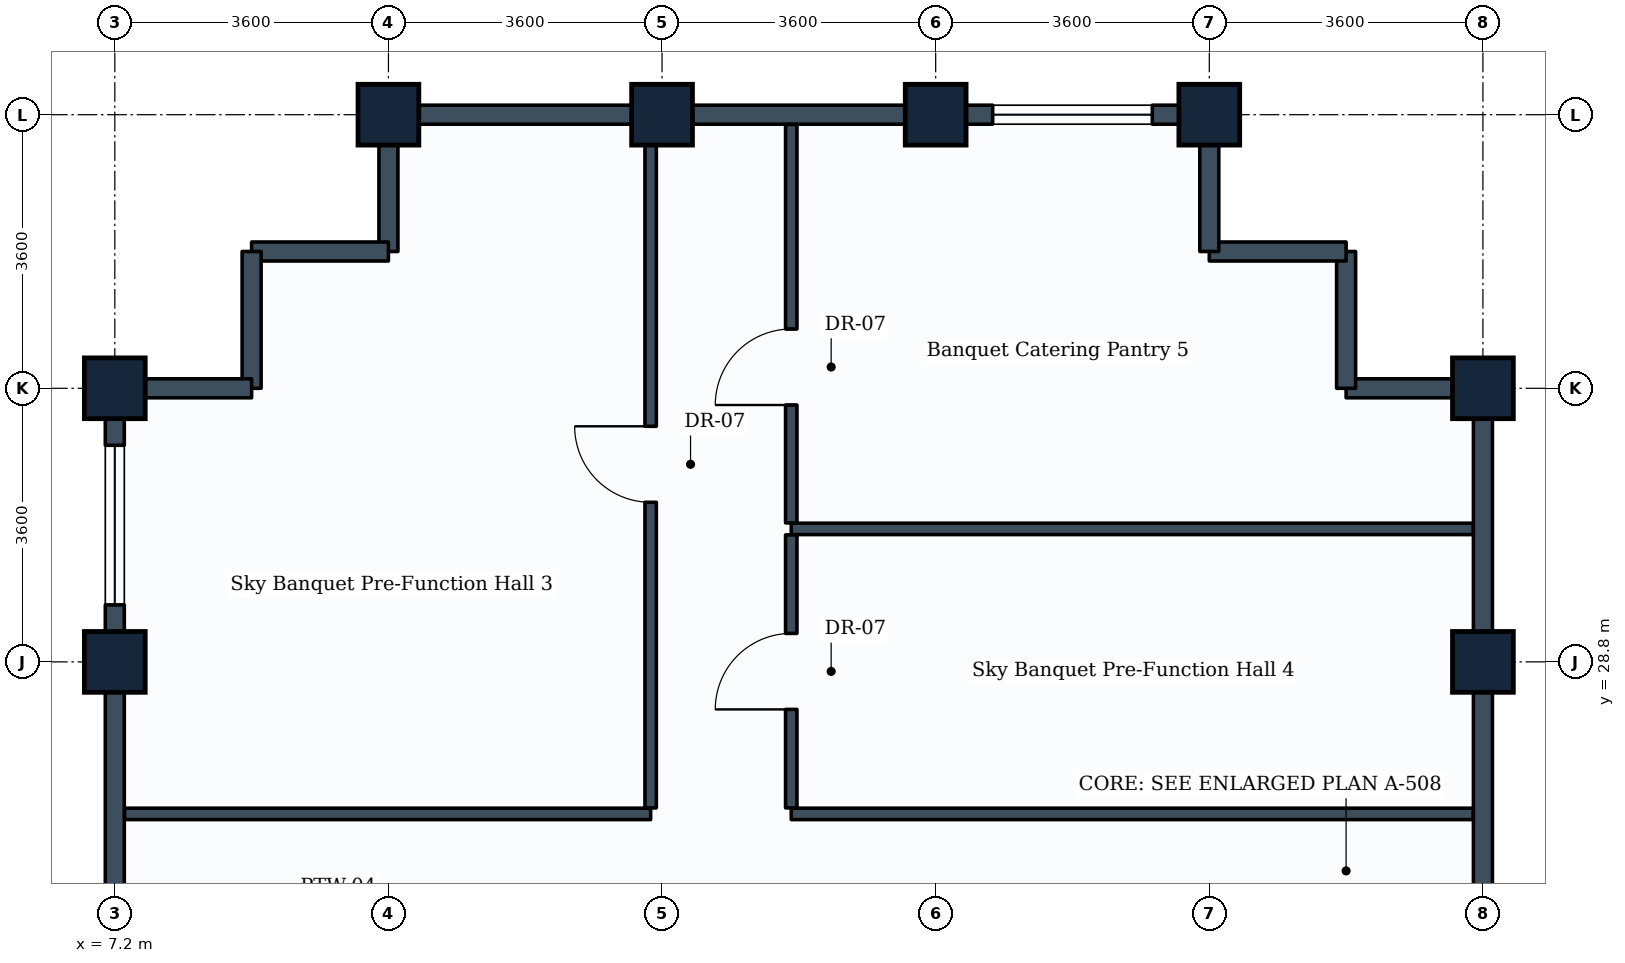
"""IFC4 building model, lengths in metres.
Left out: names, types, materials, properties, quantities, classifications, styles, units other than length and angle.
Written with IfcOpenShell. Run it as: python <this file> out.ifc"""

import sys

from ifc_helpers import new_model, si_unit, direction, frame, frame_2d, origin, origin_2d, place, context, subcontext, project, spatial, rectangle, extrude, element, fill, save


model = new_model("IFC4")
c1 = context("Model", 3, precision=1e-05, world=origin(), true_north=direction((0.0, 1.0)))
c2 = subcontext(c1, "Body", "Model", "MODEL_VIEW")
j1 = project(units=[si_unit("LENGTHUNIT", "METRE"), si_unit("PLANEANGLEUNIT", "RADIAN")], contexts=[c1])
p1 = place(None, origin())
s1 = spatial("IfcSite", under=j1, at=p1, CompositionType="ELEMENT")
p2 = place(p1, origin())
s2 = spatial("IfcBuilding", under=s1, at=p2, CompositionType="ELEMENT")
p3 = place(p2, frame((0.0, 0.0, 246.2)))
s3 = spatial("IfcBuildingStorey", under=s2, at=p3, CompositionType="ELEMENT", Elevation=246.2)
for number, where, z_axis, x_axis in (
    (1, (7.2, 28.8, 0.0), (0.0, 0.0, 1.0), (0.0, 1.0, 0.0)),
    (2, (7.2, 32.4, 0.0), (0.0, 0.0, 1.0), (0.0, 1.0, 0.0)),
    (3, (10.8, 36.0, 0.0), (0.0, 0.0, 1.0), (1.0, 0.0, 0.0)),
    (4, (14.4, 36.0, 0.0), (0.0, 0.0, 1.0), (1.0, 0.0, 0.0)),
    (5, (18.0, 36.0, 0.0), (0.0, 0.0, 1.0), (1.0, 0.0, 0.0)),
    (6, (21.6, 36.0, 0.0), (0.0, 0.0, 1.0), (1.0, 0.0, 0.0)),
    (7, (25.2, 28.8, 0.0), (0.0, 0.0, 1.0), (0.0, 1.0, 0.0)),
    (8, (25.2, 32.4, 0.0), (0.0, 0.0, 1.0), (0.0, 1.0, 0.0)),
):
    element("IfcColumn", number, at=place(p3, frame(where, z_axis=z_axis, x_axis=x_axis)), inside=s3, PredefinedType="COLUMN", context=c2, shape_type="SweptSolid", body=[
        extrude(rectangle(XDim=0.8, YDim=0.8, at=origin_2d()), origin(), (0.0, 0.0, 1.0), 3.6),
    ])
p4 = place(p3, frame((25.2, 28.8, 0.0), z_axis=(0.0, 0.0, 1.0), x_axis=(0.0, -1.0, 0.0)))
e9 = element("IfcWall", 9, at=p4, inside=s3, PredefinedType="STANDARD", context=c2, shape_type="SweptSolid", body=[
    extrude(rectangle(XDim=3.6, YDim=0.25, at=frame_2d((1.8, 0.0))), origin(), (0.0, 0.0, 1.0), 2.83),
])
p5 = place(p3, frame((25.2, 32.4, 0.0), z_axis=(0.0, 0.0, 1.0), x_axis=(0.0, -1.0, 0.0)))
e10 = element("IfcWall", 10, at=p5, inside=s3, PredefinedType="STANDARD", context=c2, shape_type="SweptSolid", body=[
    extrude(rectangle(XDim=3.6, YDim=0.25, at=frame_2d((1.8, 0.0))), origin(), (0.0, 0.0, 1.0), 2.83),
])
p6 = place(p3, frame((23.4, 32.4, 0.0), z_axis=(0.0, 0.0, 1.0), x_axis=(1.0, 0.0, 0.0)))
e11 = element("IfcWall", 11, at=p6, inside=s3, PredefinedType="STANDARD", context=c2, shape_type="SweptSolid", body=[
    extrude(rectangle(XDim=1.8, YDim=0.25, at=frame_2d((0.9, 0.0))), origin(), (0.0, 0.0, 1.0), 2.83),
])
p7 = place(p3, frame((23.4, 32.4, 0.0), z_axis=(0.0, 0.0, 1.0), x_axis=(0.0, 1.0, 0.0)))
e12 = element("IfcWall", 12, at=p7, inside=s3, PredefinedType="STANDARD", context=c2, shape_type="SweptSolid", body=[
    extrude(rectangle(XDim=1.8, YDim=0.25, at=frame_2d((0.9, 0.0))), origin(), (0.0, 0.0, 1.0), 3.265),
])
p8 = place(p3, frame((21.6, 34.2, 0.0), z_axis=(0.0, 0.0, 1.0), x_axis=(1.0, 0.0, 0.0)))
e13 = element("IfcWall", 13, at=p8, inside=s3, PredefinedType="STANDARD", context=c2, shape_type="SweptSolid", body=[
    extrude(rectangle(XDim=1.8, YDim=0.25, at=frame_2d((0.9, 0.0))), origin(), (0.0, 0.0, 1.0), 3.265),
])
p9 = place(p3, frame((21.6, 34.2, 0.0), z_axis=(0.0, 0.0, 1.0), x_axis=(0.0, 1.0, 0.0)))
e14 = element("IfcWall", 14, at=p9, inside=s3, PredefinedType="STANDARD", context=c2, shape_type="SweptSolid", body=[
    extrude(rectangle(XDim=1.8, YDim=0.25, at=frame_2d((0.9, 0.0))), origin(), (0.0, 0.0, 1.0), 2.83),
])
p10 = place(p3, frame((18.0, 36.0, 0.0), z_axis=(0.0, 0.0, 1.0), x_axis=(1.0, 0.0, 0.0)))
e15 = element("IfcWall", 15, at=p10, inside=s3, PredefinedType="STANDARD", context=c2, shape_type="SweptSolid", body=[
    extrude(rectangle(XDim=3.6, YDim=0.25, at=frame_2d((1.8, 0.0))), origin(), (0.0, 0.0, 1.0), 2.83),
])
p11 = place(p10, frame((0.75, 0.0, 0.85)))
e16 = element("IfcOpeningElement", 16, at=p11, cuts=e15, PredefinedType="OPENING", context=c2, shape_type="SweptSolid", body=[
    extrude(rectangle(XDim=2.1, YDim=1.35, at=frame_2d((1.05, 0.675))), frame((0.0, 0.135, 0.0), z_axis=(0.0, -1.0, 0.0), x_axis=(1.0, 0.0, 0.0)), (0.0, 0.0, 1.0), 0.27),
])
p12 = place(p3, frame((14.4, 36.0, 0.0), z_axis=(0.0, 0.0, 1.0), x_axis=(1.0, 0.0, 0.0)))
e17 = element("IfcWall", 17, at=p12, inside=s3, PredefinedType="STANDARD", context=c2, shape_type="SweptSolid", body=[
    extrude(rectangle(XDim=3.6, YDim=0.25, at=frame_2d((1.8, 0.0))), origin(), (0.0, 0.0, 1.0), 2.83),
])
p13 = place(p3, frame((10.8, 36.0, 0.0), z_axis=(0.0, 0.0, 1.0), x_axis=(1.0, 0.0, 0.0)))
e18 = element("IfcWall", 18, at=p13, inside=s3, PredefinedType="STANDARD", context=c2, shape_type="SweptSolid", body=[
    extrude(rectangle(XDim=3.6, YDim=0.25, at=frame_2d((1.8, 0.0))), origin(), (0.0, 0.0, 1.0), 2.83),
])
p14 = place(p3, frame((10.8, 34.2, 0.0), z_axis=(0.0, 0.0, 1.0), x_axis=(0.0, 1.0, 0.0)))
e19 = element("IfcWall", 19, at=p14, inside=s3, PredefinedType="STANDARD", context=c2, shape_type="SweptSolid", body=[
    extrude(rectangle(XDim=1.8, YDim=0.25, at=frame_2d((0.9, 0.0))), origin(), (0.0, 0.0, 1.0), 2.83),
])
for number, where, z_axis, x_axis in (
    (20, (9.0, 34.2, 0.0), (0.0, 0.0, 1.0), (1.0, 0.0, 0.0)),
    (21, (9.0, 32.4, 0.0), (0.0, 0.0, 1.0), (0.0, 1.0, 0.0)),
):
    element("IfcWall", number, at=place(p3, frame(where, z_axis=z_axis, x_axis=x_axis)), inside=s3, PredefinedType="STANDARD", context=c2, shape_type="SweptSolid", body=[
        extrude(rectangle(XDim=1.8, YDim=0.25, at=frame_2d((0.9, 0.0))), origin(), (0.0, 0.0, 1.0), 3.265),
    ])
p15 = place(p3, frame((7.2, 32.4, 0.0), z_axis=(0.0, 0.0, 1.0), x_axis=(1.0, 0.0, 0.0)))
e22 = element("IfcWall", 22, at=p15, inside=s3, PredefinedType="STANDARD", context=c2, shape_type="SweptSolid", body=[
    extrude(rectangle(XDim=1.8, YDim=0.25, at=frame_2d((0.9, 0.0))), origin(), (0.0, 0.0, 1.0), 2.83),
])
p16 = place(p3, frame((7.2, 28.8, 0.0), z_axis=(0.0, 0.0, 1.0), x_axis=(0.0, 1.0, 0.0)))
e23 = element("IfcWall", 23, at=p16, inside=s3, PredefinedType="STANDARD", context=c2, shape_type="SweptSolid", body=[
    extrude(rectangle(XDim=3.6, YDim=0.25, at=frame_2d((1.8, 0.0))), origin(), (0.0, 0.0, 1.0), 2.83),
])
p17 = place(p16, frame((0.75, 0.0, 0.85)))
e24 = element("IfcOpeningElement", 24, at=p17, cuts=e23, PredefinedType="OPENING", context=c2, shape_type="SweptSolid", body=[
    extrude(rectangle(XDim=2.1, YDim=1.35, at=frame_2d((1.05, 0.675))), frame((0.0, 0.135, 0.0), z_axis=(0.0, -1.0, 0.0), x_axis=(1.0, 0.0, 0.0)), (0.0, 0.0, 1.0), 0.27),
])
p18 = place(p3, frame((7.2, 25.2, 0.0), z_axis=(0.0, 0.0, 1.0), x_axis=(0.0, 1.0, 0.0)))
e25 = element("IfcWall", 25, at=p18, inside=s3, PredefinedType="STANDARD", context=c2, shape_type="SweptSolid", body=[
    extrude(rectangle(XDim=3.6, YDim=0.25, at=frame_2d((1.8, 0.0))), origin(), (0.0, 0.0, 1.0), 2.83),
])
p19 = place(p3, frame((7.329, 26.8, 0.0), z_axis=(0.0, 0.0, 1.0), x_axis=(1.0, 0.0, 0.0)))
e26 = element("IfcWall", 26, at=p19, inside=s3, PredefinedType="PARTITIONING", context=c2, shape_type="SweptSolid", body=[
    extrude(rectangle(XDim=6.921, YDim=0.15, at=frame_2d((3.46, 0.0))), origin(), (0.0, 0.0, 1.0), 2.83),
])
p20 = place(p3, frame((14.25, 26.879, 0.0), z_axis=(0.0, 0.0, 1.0), x_axis=(0.0, 1.0, 0.0)))
e27 = element("IfcWall", 27, at=p20, inside=s3, PredefinedType="PARTITIONING", context=c2, shape_type="SweptSolid", body=[
    extrude(rectangle(XDim=8.992, YDim=0.15, at=frame_2d((4.496, 0.0))), origin(), (0.0, 0.0, 1.0), 2.83),
])
p21 = place(p20, frame((4.021, 0.0, 0.0)))
e28 = element("IfcOpeningElement", 28, at=p21, cuts=e27, PredefinedType="OPENING", context=c2, shape_type="SweptSolid", body=[
    extrude(rectangle(XDim=1.0, YDim=2.1, at=frame_2d((0.5, 1.05))), frame((0.0, 0.085, 0.0), z_axis=(0.0, -1.0, 0.0), x_axis=(1.0, 0.0, 0.0)), (0.0, 0.0, 1.0), 0.17),
])
for number, where, z_axis, x_axis in (
    (29, (16.1, 26.8, 0.0), (0.0, 0.0, 1.0), (1.0, 0.0, 0.0)),
    (30, (16.1, 30.55, 0.0), (0.0, 0.0, 1.0), (1.0, 0.0, 0.0)),
):
    element("IfcWall", number, at=place(p3, frame(where, z_axis=z_axis, x_axis=x_axis)), inside=s3, PredefinedType="PARTITIONING", context=c2, shape_type="SweptSolid", body=[
        extrude(rectangle(XDim=8.971, YDim=0.15, at=frame_2d((4.485, 0.0))), origin(), (0.0, 0.0, 1.0), 2.83),
    ])
p22 = place(p3, frame((16.1, 26.879, 0.0), z_axis=(0.0, 0.0, 1.0), x_axis=(0.0, 1.0, 0.0)))
e31 = element("IfcWall", 31, at=p22, inside=s3, PredefinedType="PARTITIONING", context=c2, shape_type="SweptSolid", body=[
    extrude(rectangle(XDim=3.592, YDim=0.15, at=frame_2d((1.796, 0.0))), origin(), (0.0, 0.0, 1.0), 2.95),
])
p23 = place(p22, frame((1.296, 0.0, 0.0)))
e32 = element("IfcOpeningElement", 32, at=p23, cuts=e31, PredefinedType="OPENING", context=c2, shape_type="SweptSolid", body=[
    extrude(rectangle(XDim=1.0, YDim=2.1, at=frame_2d((0.5, 1.05))), frame((0.0, 0.085, 0.0), z_axis=(0.0, -1.0, 0.0), x_axis=(1.0, 0.0, 0.0)), (0.0, 0.0, 1.0), 0.17),
])
p24 = place(p3, frame((16.1, 30.629, 0.0), z_axis=(0.0, 0.0, 1.0), x_axis=(0.0, 1.0, 0.0)))
e33 = element("IfcWall", 33, at=p24, inside=s3, PredefinedType="PARTITIONING", context=c2, shape_type="SweptSolid", body=[
    extrude(rectangle(XDim=5.242, YDim=0.15, at=frame_2d((2.621, 0.0))), origin(), (0.0, 0.0, 1.0), 2.83),
])
p25 = place(p24, frame((1.551, 0.0, 0.0)))
e34 = element("IfcOpeningElement", 34, at=p25, cuts=e33, PredefinedType="OPENING", context=c2, shape_type="SweptSolid", body=[
    extrude(rectangle(XDim=1.0, YDim=2.1, at=frame_2d((0.5, 1.05))), frame((0.0, 0.085, 0.0), z_axis=(0.0, -1.0, 0.0), x_axis=(1.0, 0.0, 0.0)), (0.0, 0.0, 1.0), 0.17),
])
p26 = place(p11, origin())
e35 = element("IfcWindow", 35, at=p26, inside=s3, PartitioningType="SINGLE_PANEL", PredefinedType="WINDOW", context=c2, shape_type="SweptSolid", body=[
    extrude(rectangle(XDim=2.1, YDim=1.35, at=frame_2d((1.05, 0.675))), frame((0.0, 0.03, 0.0), z_axis=(0.0, -1.0, 0.0), x_axis=(1.0, 0.0, 0.0)), (0.0, 0.0, 1.0), 0.06),
])
fill(e16, e35)
p27 = place(p17, origin())
e36 = element("IfcWindow", 36, at=p27, inside=s3, PartitioningType="SINGLE_PANEL", PredefinedType="WINDOW", context=c2, shape_type="SweptSolid", body=[
    extrude(rectangle(XDim=2.1, YDim=1.35, at=frame_2d((1.05, 0.675))), frame((0.0, 0.03, 0.0), z_axis=(0.0, -1.0, 0.0), x_axis=(1.0, 0.0, 0.0)), (0.0, 0.0, 1.0), 0.06),
])
fill(e24, e36)
p28 = place(p21, origin())
e37 = element("IfcDoor", 37, at=p28, inside=s3, OperationType="SINGLE_SWING_RIGHT", PredefinedType="DOOR", context=c2, shape_type="SweptSolid", body=[
    extrude(rectangle(XDim=1.0, YDim=2.1, at=frame_2d((0.5, 1.05))), frame((0.0, 0.025, 0.0), z_axis=(0.0, -1.0, 0.0), x_axis=(1.0, 0.0, 0.0)), (0.0, 0.0, 1.0), 0.05),
])
fill(e28, e37)
p29 = place(p23, origin())
e38 = element("IfcDoor", 38, at=p29, inside=s3, OperationType="SINGLE_SWING_LEFT", PredefinedType="DOOR", context=c2, shape_type="SweptSolid", body=[
    extrude(rectangle(XDim=1.0, YDim=2.1, at=frame_2d((0.5, 1.05))), frame((0.0, 0.025, 0.0), z_axis=(0.0, -1.0, 0.0), x_axis=(1.0, 0.0, 0.0)), (0.0, 0.0, 1.0), 0.05),
])
fill(e32, e38)
p30 = place(p25, origin())
e39 = element("IfcDoor", 39, at=p30, inside=s3, OperationType="SINGLE_SWING_LEFT", PredefinedType="DOOR", context=c2, shape_type="SweptSolid", body=[
    extrude(rectangle(XDim=1.0, YDim=2.1, at=frame_2d((0.5, 1.05))), frame((0.0, 0.025, 0.0), z_axis=(0.0, -1.0, 0.0), x_axis=(1.0, 0.0, 0.0)), (0.0, 0.0, 1.0), 0.05),
])
fill(e34, e39)
save(model, sys.argv[1])
